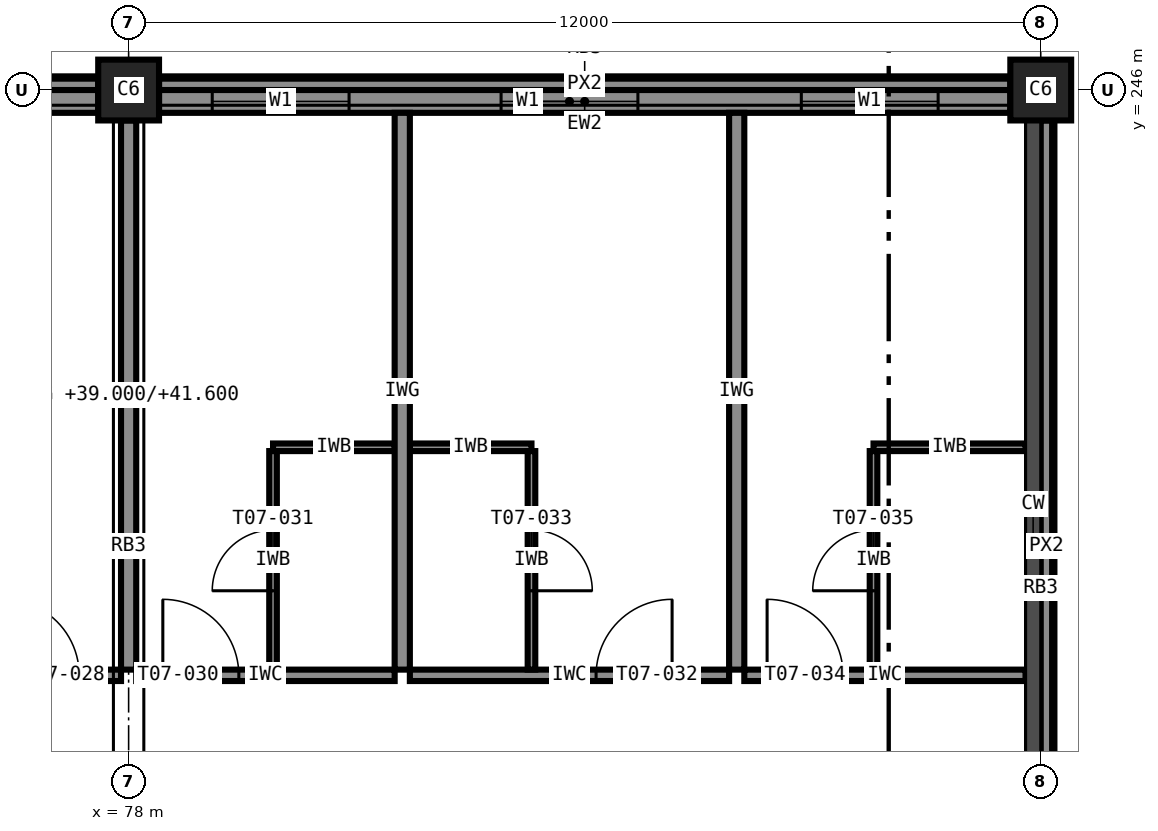
"""IFC4 building model, lengths in metres.
Left out: names, types, materials, properties, quantities, classifications, styles, units other than length and angle.
Written with IfcOpenShell. Run it as: python <this file> out.ifc"""

import sys

from ifc_helpers import new_model, si_unit, direction, frame, frame_2d, origin, origin_2d, place, context, subcontext, project, spatial, rectangle, extrude, element, fill, save


model = new_model("IFC4")
c1 = context("Model", 3, precision=1e-05, world=origin(), true_north=direction((0.0, 1.0)))
c2 = subcontext(c1, "Body", "Model", "MODEL_VIEW")
j1 = project(units=[si_unit("LENGTHUNIT", "METRE"), si_unit("PLANEANGLEUNIT", "RADIAN")], contexts=[c1])
p1 = place(None, origin())
s1 = spatial("IfcSite", under=j1, at=p1, CompositionType="ELEMENT")
p2 = place(p1, origin())
s2 = spatial("IfcBuilding", under=s1, at=p2, CompositionType="ELEMENT")
p3 = place(p2, frame((0.0, 0.0, 39.0)))
s3 = spatial("IfcBuildingStorey", under=s2, at=p3, CompositionType="ELEMENT", Elevation=39.0)
for number, where, z_axis, x_axis in (
    (1, (78.0, 246.0, 0.0), (0.0, 0.0, 1.0), (1.0, 0.0, 0.0)),
    (2, (90.0, 246.0, 0.0), (0.0, 0.0, 1.0), (1.0, 0.0, 0.0)),
):
    element("IfcColumn", number, at=place(p3, frame(where, z_axis=z_axis, x_axis=x_axis)), inside=s3, PredefinedType="COLUMN", context=c2, shape_type="SweptSolid", body=[
        extrude(rectangle(XDim=0.8, YDim=0.8, at=origin_2d()), origin(), (0.0, 0.0, 1.0), 3.6),
    ])
p4 = place(p3, frame((90.075, 234.4, 3.4), z_axis=(0.0, 0.0, 1.0), x_axis=(0.0, 1.0, 0.0)))
e3 = element("IfcWall", 3, at=p4, inside=s3, PredefinedType="STANDARD", context=c2, shape_type="SweptSolid", body=[
    extrude(rectangle(XDim=11.2, YDim=0.15, at=frame_2d((5.6, 0.0))), origin(), (0.0, 0.0, 1.0), 0.2),
])
p5 = place(p3, frame((89.6, 245.85, 0.0), z_axis=(0.0, 0.0, 1.0), x_axis=(-1.0, 0.0, 0.0)))
e4 = element("IfcWall", 4, at=p5, inside=s3, PredefinedType="STANDARD", context=c2, shape_type="SweptSolid", body=[
    extrude(rectangle(XDim=11.2, YDim=0.3, at=frame_2d((5.6, 0.0))), origin(), (0.0, 0.0, 1.0), 2.6),
])
p6 = place(p5, frame((8.7, 0.0, 0.85)))
e5 = element("IfcOpeningElement", 5, at=p6, cuts=e4, PredefinedType="OPENING", context=c2, shape_type="SweptSolid", body=[
    extrude(rectangle(XDim=1.8, YDim=1.75, at=frame_2d((0.9, 0.875))), frame((0.0, 0.16, 0.0), z_axis=(0.0, -1.0, 0.0), x_axis=(1.0, 0.0, 0.0)), (0.0, 0.0, 1.0), 0.32),
])
p7 = place(p5, frame((4.9, 0.0, 0.85)))
e6 = element("IfcOpeningElement", 6, at=p7, cuts=e4, PredefinedType="OPENING", context=c2, shape_type="SweptSolid", body=[
    extrude(rectangle(XDim=1.8, YDim=1.75, at=frame_2d((0.9, 0.875))), frame((0.0, 0.16, 0.0), z_axis=(0.0, -1.0, 0.0), x_axis=(1.0, 0.0, 0.0)), (0.0, 0.0, 1.0), 0.32),
])
p8 = place(p5, frame((0.95, 0.0, 0.85)))
e7 = element("IfcOpeningElement", 7, at=p8, cuts=e4, PredefinedType="OPENING", context=c2, shape_type="SweptSolid", body=[
    extrude(rectangle(XDim=1.8, YDim=1.75, at=frame_2d((0.9, 0.875))), frame((0.0, 0.16, 0.0), z_axis=(0.0, -1.0, 0.0), x_axis=(1.0, 0.0, 0.0)), (0.0, 0.0, 1.0), 0.32),
])
p9 = place(p3, frame((77.6, 245.85, 0.0), z_axis=(0.0, 0.0, 1.0), x_axis=(-1.0, 0.0, 0.0)))
e8 = element("IfcWall", 8, at=p9, inside=s3, PredefinedType="STANDARD", context=c2, shape_type="SweptSolid", body=[
    extrude(rectangle(XDim=11.2, YDim=0.3, at=frame_2d((5.6, 0.0))), origin(), (0.0, 0.0, 1.0), 2.6),
])
p10 = place(p9, frame((8.5, 0.0, 0.85)))
e9 = element("IfcOpeningElement", 9, at=p10, cuts=e8, PredefinedType="OPENING", context=c2, shape_type="SweptSolid", body=[
    extrude(rectangle(XDim=1.8, YDim=1.75, at=frame_2d((0.9, 0.875))), frame((0.0, 0.16, 0.0), z_axis=(0.0, -1.0, 0.0), x_axis=(1.0, 0.0, 0.0)), (0.0, 0.0, 1.0), 0.32),
])
p11 = place(p9, frame((4.7, 0.0, 0.85)))
e10 = element("IfcOpeningElement", 10, at=p11, cuts=e8, PredefinedType="OPENING", context=c2, shape_type="SweptSolid", body=[
    extrude(rectangle(XDim=1.8, YDim=1.75, at=frame_2d((0.9, 0.875))), frame((0.0, 0.16, 0.0), z_axis=(0.0, -1.0, 0.0), x_axis=(1.0, 0.0, 0.0)), (0.0, 0.0, 1.0), 0.32),
])
p12 = place(p9, frame((0.9, 0.0, 0.85)))
e11 = element("IfcOpeningElement", 11, at=p12, cuts=e8, PredefinedType="OPENING", context=c2, shape_type="SweptSolid", body=[
    extrude(rectangle(XDim=1.8, YDim=1.75, at=frame_2d((0.9, 0.875))), frame((0.0, 0.16, 0.0), z_axis=(0.0, -1.0, 0.0), x_axis=(1.0, 0.0, 0.0)), (0.0, 0.0, 1.0), 0.32),
])
for number, where, z_axis, x_axis in (
    (12, (89.6, 246.075, 3.4), (0.0, 0.0, 1.0), (-1.0, 0.0, 0.0)),
    (13, (77.6, 246.075, 3.4), (0.0, 0.0, 1.0), (-1.0, 0.0, 0.0)),
):
    element("IfcWall", number, at=place(p3, frame(where, z_axis=z_axis, x_axis=x_axis)), inside=s3, PredefinedType="STANDARD", context=c2, shape_type="SweptSolid", body=[
        extrude(rectangle(XDim=11.2, YDim=0.15, at=frame_2d((5.6, 0.0))), origin(), (0.0, 0.0, 1.0), 0.2),
    ])
p13 = place(p3, frame((74.1, 238.3, 0.0), z_axis=(0.0, 0.0, 1.0), x_axis=(1.0, 0.0, 0.0)))
e14 = element("IfcWall", 14, at=p13, inside=s3, PredefinedType="PARTITIONING", context=c2, shape_type="SweptSolid", body=[
    extrude(rectangle(XDim=3.8, YDim=0.15, at=frame_2d((1.9, 0.0))), origin(), (0.0, 0.0, 1.0), 3.4),
])
p14 = place(p13, frame((2.25, 0.0, 0.0)))
e15 = element("IfcOpeningElement", 15, at=p14, cuts=e14, PredefinedType="OPENING", context=c2, shape_type="SweptSolid", body=[
    extrude(rectangle(XDim=1.0, YDim=2.1, at=frame_2d((0.5, 1.05))), frame((0.0, 0.085, 0.0), z_axis=(0.0, -1.0, 0.0), x_axis=(1.0, 0.0, 0.0)), (0.0, 0.0, 1.0), 0.17),
])
p15 = place(p3, frame((78.1, 238.3, 0.0), z_axis=(0.0, 0.0, 1.0), x_axis=(1.0, 0.0, 0.0)))
e16 = element("IfcWall", 16, at=p15, inside=s3, PredefinedType="PARTITIONING", context=c2, shape_type="SweptSolid", body=[
    extrude(rectangle(XDim=3.4, YDim=0.15, at=frame_2d((1.7, 0.0))), origin(), (0.0, 0.0, 1.0), 3.4),
])
p16 = place(p15, frame((0.35, 0.0, 0.0)))
e17 = element("IfcOpeningElement", 17, at=p16, cuts=e16, PredefinedType="OPENING", context=c2, shape_type="SweptSolid", body=[
    extrude(rectangle(XDim=1.0, YDim=2.1, at=frame_2d((0.5, 1.05))), frame((0.0, 0.085, 0.0), z_axis=(0.0, -1.0, 0.0), x_axis=(1.0, 0.0, 0.0)), (0.0, 0.0, 1.0), 0.17),
])
p17 = place(p3, frame((79.9, 241.3, 0.0), z_axis=(0.0, 0.0, 1.0), x_axis=(1.0, 0.0, 0.0)))
e18 = element("IfcWall", 18, at=p17, inside=s3, PredefinedType="PARTITIONING", context=c2, shape_type="SweptSolid", body=[
    extrude(rectangle(XDim=1.6, YDim=0.1, at=frame_2d((0.8, 0.0))), origin(), (0.0, 0.0, 1.0), 3.4),
])
p18 = place(p3, frame((79.9, 238.375, 0.0), z_axis=(0.0, 0.0, 1.0), x_axis=(0.0, 1.0, 0.0)))
e19 = element("IfcWall", 19, at=p18, inside=s3, PredefinedType="PARTITIONING", context=c2, shape_type="SweptSolid", body=[
    extrude(rectangle(XDim=2.875, YDim=0.1, at=frame_2d((1.438, 0.0))), origin(), (0.0, 0.0, 1.0), 3.4),
])
p19 = place(p18, frame((1.038, 0.0, 0.0)))
e20 = element("IfcOpeningElement", 20, at=p19, cuts=e19, PredefinedType="OPENING", context=c2, shape_type="SweptSolid", body=[
    extrude(rectangle(XDim=0.8, YDim=2.1, at=frame_2d((0.4, 1.05))), frame((0.0, 0.06, 0.0), z_axis=(0.0, -1.0, 0.0), x_axis=(1.0, 0.0, 0.0)), (0.0, 0.0, 1.0), 0.12),
])
p20 = place(p3, frame((81.7, 238.3, 0.0), z_axis=(0.0, 0.0, 1.0), x_axis=(1.0, 0.0, 0.0)))
e21 = element("IfcWall", 21, at=p20, inside=s3, PredefinedType="PARTITIONING", context=c2, shape_type="SweptSolid", body=[
    extrude(rectangle(XDim=4.2, YDim=0.15, at=frame_2d((2.1, 0.0))), origin(), (0.0, 0.0, 1.0), 3.4),
])
p21 = place(p20, frame((2.45, 0.0, 0.0)))
e22 = element("IfcOpeningElement", 22, at=p21, cuts=e21, PredefinedType="OPENING", context=c2, shape_type="SweptSolid", body=[
    extrude(rectangle(XDim=1.0, YDim=2.1, at=frame_2d((0.5, 1.05))), frame((0.0, 0.085, 0.0), z_axis=(0.0, -1.0, 0.0), x_axis=(1.0, 0.0, 0.0)), (0.0, 0.0, 1.0), 0.17),
])
p22 = place(p3, frame((81.7, 241.3, 0.0), z_axis=(0.0, 0.0, 1.0), x_axis=(1.0, 0.0, 0.0)))
e23 = element("IfcWall", 23, at=p22, inside=s3, PredefinedType="PARTITIONING", context=c2, shape_type="SweptSolid", body=[
    extrude(rectangle(XDim=1.6, YDim=0.1, at=frame_2d((0.8, 0.0))), origin(), (0.0, 0.0, 1.0), 3.4),
])
p23 = place(p3, frame((83.3, 241.25, 0.0), z_axis=(0.0, 0.0, 1.0), x_axis=(0.0, -1.0, 0.0)))
e24 = element("IfcWall", 24, at=p23, inside=s3, PredefinedType="PARTITIONING", context=c2, shape_type="SweptSolid", body=[
    extrude(rectangle(XDim=2.875, YDim=0.1, at=frame_2d((1.438, 0.0))), origin(), (0.0, 0.0, 1.0), 3.4),
])
p24 = place(p23, frame((1.038, 0.0, 0.0)))
e25 = element("IfcOpeningElement", 25, at=p24, cuts=e24, PredefinedType="OPENING", context=c2, shape_type="SweptSolid", body=[
    extrude(rectangle(XDim=0.8, YDim=2.1, at=frame_2d((0.4, 1.05))), frame((0.0, 0.06, 0.0), z_axis=(0.0, -1.0, 0.0), x_axis=(1.0, 0.0, 0.0)), (0.0, 0.0, 1.0), 0.12),
])
p25 = place(p3, frame((86.1, 238.3, 0.0), z_axis=(0.0, 0.0, 1.0), x_axis=(1.0, 0.0, 0.0)))
e26 = element("IfcWall", 26, at=p25, inside=s3, PredefinedType="PARTITIONING", context=c2, shape_type="SweptSolid", body=[
    extrude(rectangle(XDim=3.7, YDim=0.15, at=frame_2d((1.85, 0.0))), origin(), (0.0, 0.0, 1.0), 3.4),
])
p26 = place(p25, frame((0.3, 0.0, 0.0)))
e27 = element("IfcOpeningElement", 27, at=p26, cuts=e26, PredefinedType="OPENING", context=c2, shape_type="SweptSolid", body=[
    extrude(rectangle(XDim=1.0, YDim=2.1, at=frame_2d((0.5, 1.05))), frame((0.0, 0.085, 0.0), z_axis=(0.0, -1.0, 0.0), x_axis=(1.0, 0.0, 0.0)), (0.0, 0.0, 1.0), 0.17),
])
p27 = place(p3, frame((87.8, 241.3, 0.0), z_axis=(0.0, 0.0, 1.0), x_axis=(1.0, 0.0, 0.0)))
e28 = element("IfcWall", 28, at=p27, inside=s3, PredefinedType="PARTITIONING", context=c2, shape_type="SweptSolid", body=[
    extrude(rectangle(XDim=2.0, YDim=0.1, at=frame_2d((1.0, 0.0))), origin(), (0.0, 0.0, 1.0), 3.4),
])
p28 = place(p3, frame((87.8, 238.375, 0.0), z_axis=(0.0, 0.0, 1.0), x_axis=(0.0, 1.0, 0.0)))
e29 = element("IfcWall", 29, at=p28, inside=s3, PredefinedType="PARTITIONING", context=c2, shape_type="SweptSolid", body=[
    extrude(rectangle(XDim=2.875, YDim=0.1, at=frame_2d((1.438, 0.0))), origin(), (0.0, 0.0, 1.0), 3.4),
])
p29 = place(p28, frame((1.038, 0.0, 0.0)))
e30 = element("IfcOpeningElement", 30, at=p29, cuts=e29, PredefinedType="OPENING", context=c2, shape_type="SweptSolid", body=[
    extrude(rectangle(XDim=0.8, YDim=2.1, at=frame_2d((0.4, 1.05))), frame((0.0, 0.06, 0.0), z_axis=(0.0, -1.0, 0.0), x_axis=(1.0, 0.0, 0.0)), (0.0, 0.0, 1.0), 0.12),
])
p30 = place(p3, frame((78.0, 245.6, 0.0), z_axis=(0.0, 0.0, 1.0), x_axis=(0.0, -1.0, 0.0)))
e31 = element("IfcWall", 31, at=p30, inside=s3, PredefinedType="PARTITIONING", context=c2, shape_type="SweptSolid", body=[
    extrude(rectangle(XDim=7.225, YDim=0.2, at=frame_2d((3.613, 0.0))), origin(), (0.0, 0.0, 1.0), 2.6),
])
for number, where, z_axis, x_axis in (
    (32, (81.6, 245.7, 0.0), (0.0, 0.0, 1.0), (0.0, -1.0, 0.0)),
    (33, (86.0, 245.7, 0.0), (0.0, 0.0, 1.0), (0.0, -1.0, 0.0)),
):
    element("IfcWall", number, at=place(p3, frame(where, z_axis=z_axis, x_axis=x_axis)), inside=s3, PredefinedType="PARTITIONING", context=c2, shape_type="SweptSolid", body=[
        extrude(rectangle(XDim=7.325, YDim=0.2, at=frame_2d((3.663, 0.0))), origin(), (0.0, 0.0, 1.0), 3.4),
    ])
p31 = place(p6, origin())
e34 = element("IfcWindow", 34, at=p31, inside=s3, PartitioningType="SINGLE_PANEL", PredefinedType="WINDOW", context=c2, shape_type="SweptSolid", body=[
    extrude(rectangle(XDim=1.8, YDim=1.75, at=frame_2d((0.9, 0.875))), frame((0.0, 0.03, 0.0), z_axis=(0.0, -1.0, 0.0), x_axis=(1.0, 0.0, 0.0)), (0.0, 0.0, 1.0), 0.06),
])
fill(e5, e34)
p32 = place(p7, origin())
e35 = element("IfcWindow", 35, at=p32, inside=s3, PartitioningType="SINGLE_PANEL", PredefinedType="WINDOW", context=c2, shape_type="SweptSolid", body=[
    extrude(rectangle(XDim=1.8, YDim=1.75, at=frame_2d((0.9, 0.875))), frame((0.0, 0.03, 0.0), z_axis=(0.0, -1.0, 0.0), x_axis=(1.0, 0.0, 0.0)), (0.0, 0.0, 1.0), 0.06),
])
fill(e6, e35)
p33 = place(p8, origin())
e36 = element("IfcWindow", 36, at=p33, inside=s3, PartitioningType="SINGLE_PANEL", PredefinedType="WINDOW", context=c2, shape_type="SweptSolid", body=[
    extrude(rectangle(XDim=1.8, YDim=1.75, at=frame_2d((0.9, 0.875))), frame((0.0, 0.03, 0.0), z_axis=(0.0, -1.0, 0.0), x_axis=(1.0, 0.0, 0.0)), (0.0, 0.0, 1.0), 0.06),
])
fill(e7, e36)
p34 = place(p14, origin())
e37 = element("IfcDoor", 37, at=p34, inside=s3, OperationType="SINGLE_SWING_LEFT", PredefinedType="DOOR", context=c2, shape_type="SweptSolid", body=[
    extrude(rectangle(XDim=1.0, YDim=2.1, at=frame_2d((0.5, 1.05))), frame((0.0, 0.025, 0.0), z_axis=(0.0, -1.0, 0.0), x_axis=(1.0, 0.0, 0.0)), (0.0, 0.0, 1.0), 0.05),
])
fill(e15, e37)
p35 = place(p16, origin())
e38 = element("IfcDoor", 38, at=p35, inside=s3, OperationType="SINGLE_SWING_LEFT", PredefinedType="DOOR", context=c2, shape_type="SweptSolid", body=[
    extrude(rectangle(XDim=1.0, YDim=2.1, at=frame_2d((0.5, 1.05))), frame((0.0, 0.025, 0.0), z_axis=(0.0, -1.0, 0.0), x_axis=(1.0, 0.0, 0.0)), (0.0, 0.0, 1.0), 0.05),
])
fill(e17, e38)
p36 = place(p19, origin())
e39 = element("IfcDoor", 39, at=p36, inside=s3, OperationType="SINGLE_SWING_LEFT", PredefinedType="DOOR", context=c2, shape_type="SweptSolid", body=[
    extrude(rectangle(XDim=0.8, YDim=2.1, at=frame_2d((0.4, 1.05))), frame((0.0, 0.025, 0.0), z_axis=(0.0, -1.0, 0.0), x_axis=(1.0, 0.0, 0.0)), (0.0, 0.0, 1.0), 0.05),
])
fill(e20, e39)
p37 = place(p21, origin())
e40 = element("IfcDoor", 40, at=p37, inside=s3, OperationType="SINGLE_SWING_RIGHT", PredefinedType="DOOR", context=c2, shape_type="SweptSolid", body=[
    extrude(rectangle(XDim=1.0, YDim=2.1, at=frame_2d((0.5, 1.05))), frame((0.0, 0.025, 0.0), z_axis=(0.0, -1.0, 0.0), x_axis=(1.0, 0.0, 0.0)), (0.0, 0.0, 1.0), 0.05),
])
fill(e22, e40)
p38 = place(p24, origin())
e41 = element("IfcDoor", 41, at=p38, inside=s3, OperationType="SINGLE_SWING_RIGHT", PredefinedType="DOOR", context=c2, shape_type="SweptSolid", body=[
    extrude(rectangle(XDim=0.8, YDim=2.1, at=frame_2d((0.4, 1.05))), frame((0.0, 0.025, 0.0), z_axis=(0.0, -1.0, 0.0), x_axis=(1.0, 0.0, 0.0)), (0.0, 0.0, 1.0), 0.05),
])
fill(e25, e41)
p39 = place(p26, origin())
e42 = element("IfcDoor", 42, at=p39, inside=s3, OperationType="SINGLE_SWING_LEFT", PredefinedType="DOOR", context=c2, shape_type="SweptSolid", body=[
    extrude(rectangle(XDim=1.0, YDim=2.1, at=frame_2d((0.5, 1.05))), frame((0.0, 0.025, 0.0), z_axis=(0.0, -1.0, 0.0), x_axis=(1.0, 0.0, 0.0)), (0.0, 0.0, 1.0), 0.05),
])
fill(e27, e42)
p40 = place(p29, origin())
e43 = element("IfcDoor", 43, at=p40, inside=s3, OperationType="SINGLE_SWING_LEFT", PredefinedType="DOOR", context=c2, shape_type="SweptSolid", body=[
    extrude(rectangle(XDim=0.8, YDim=2.1, at=frame_2d((0.4, 1.05))), frame((0.0, 0.025, 0.0), z_axis=(0.0, -1.0, 0.0), x_axis=(1.0, 0.0, 0.0)), (0.0, 0.0, 1.0), 0.05),
])
fill(e30, e43)
save(model, sys.argv[1])
